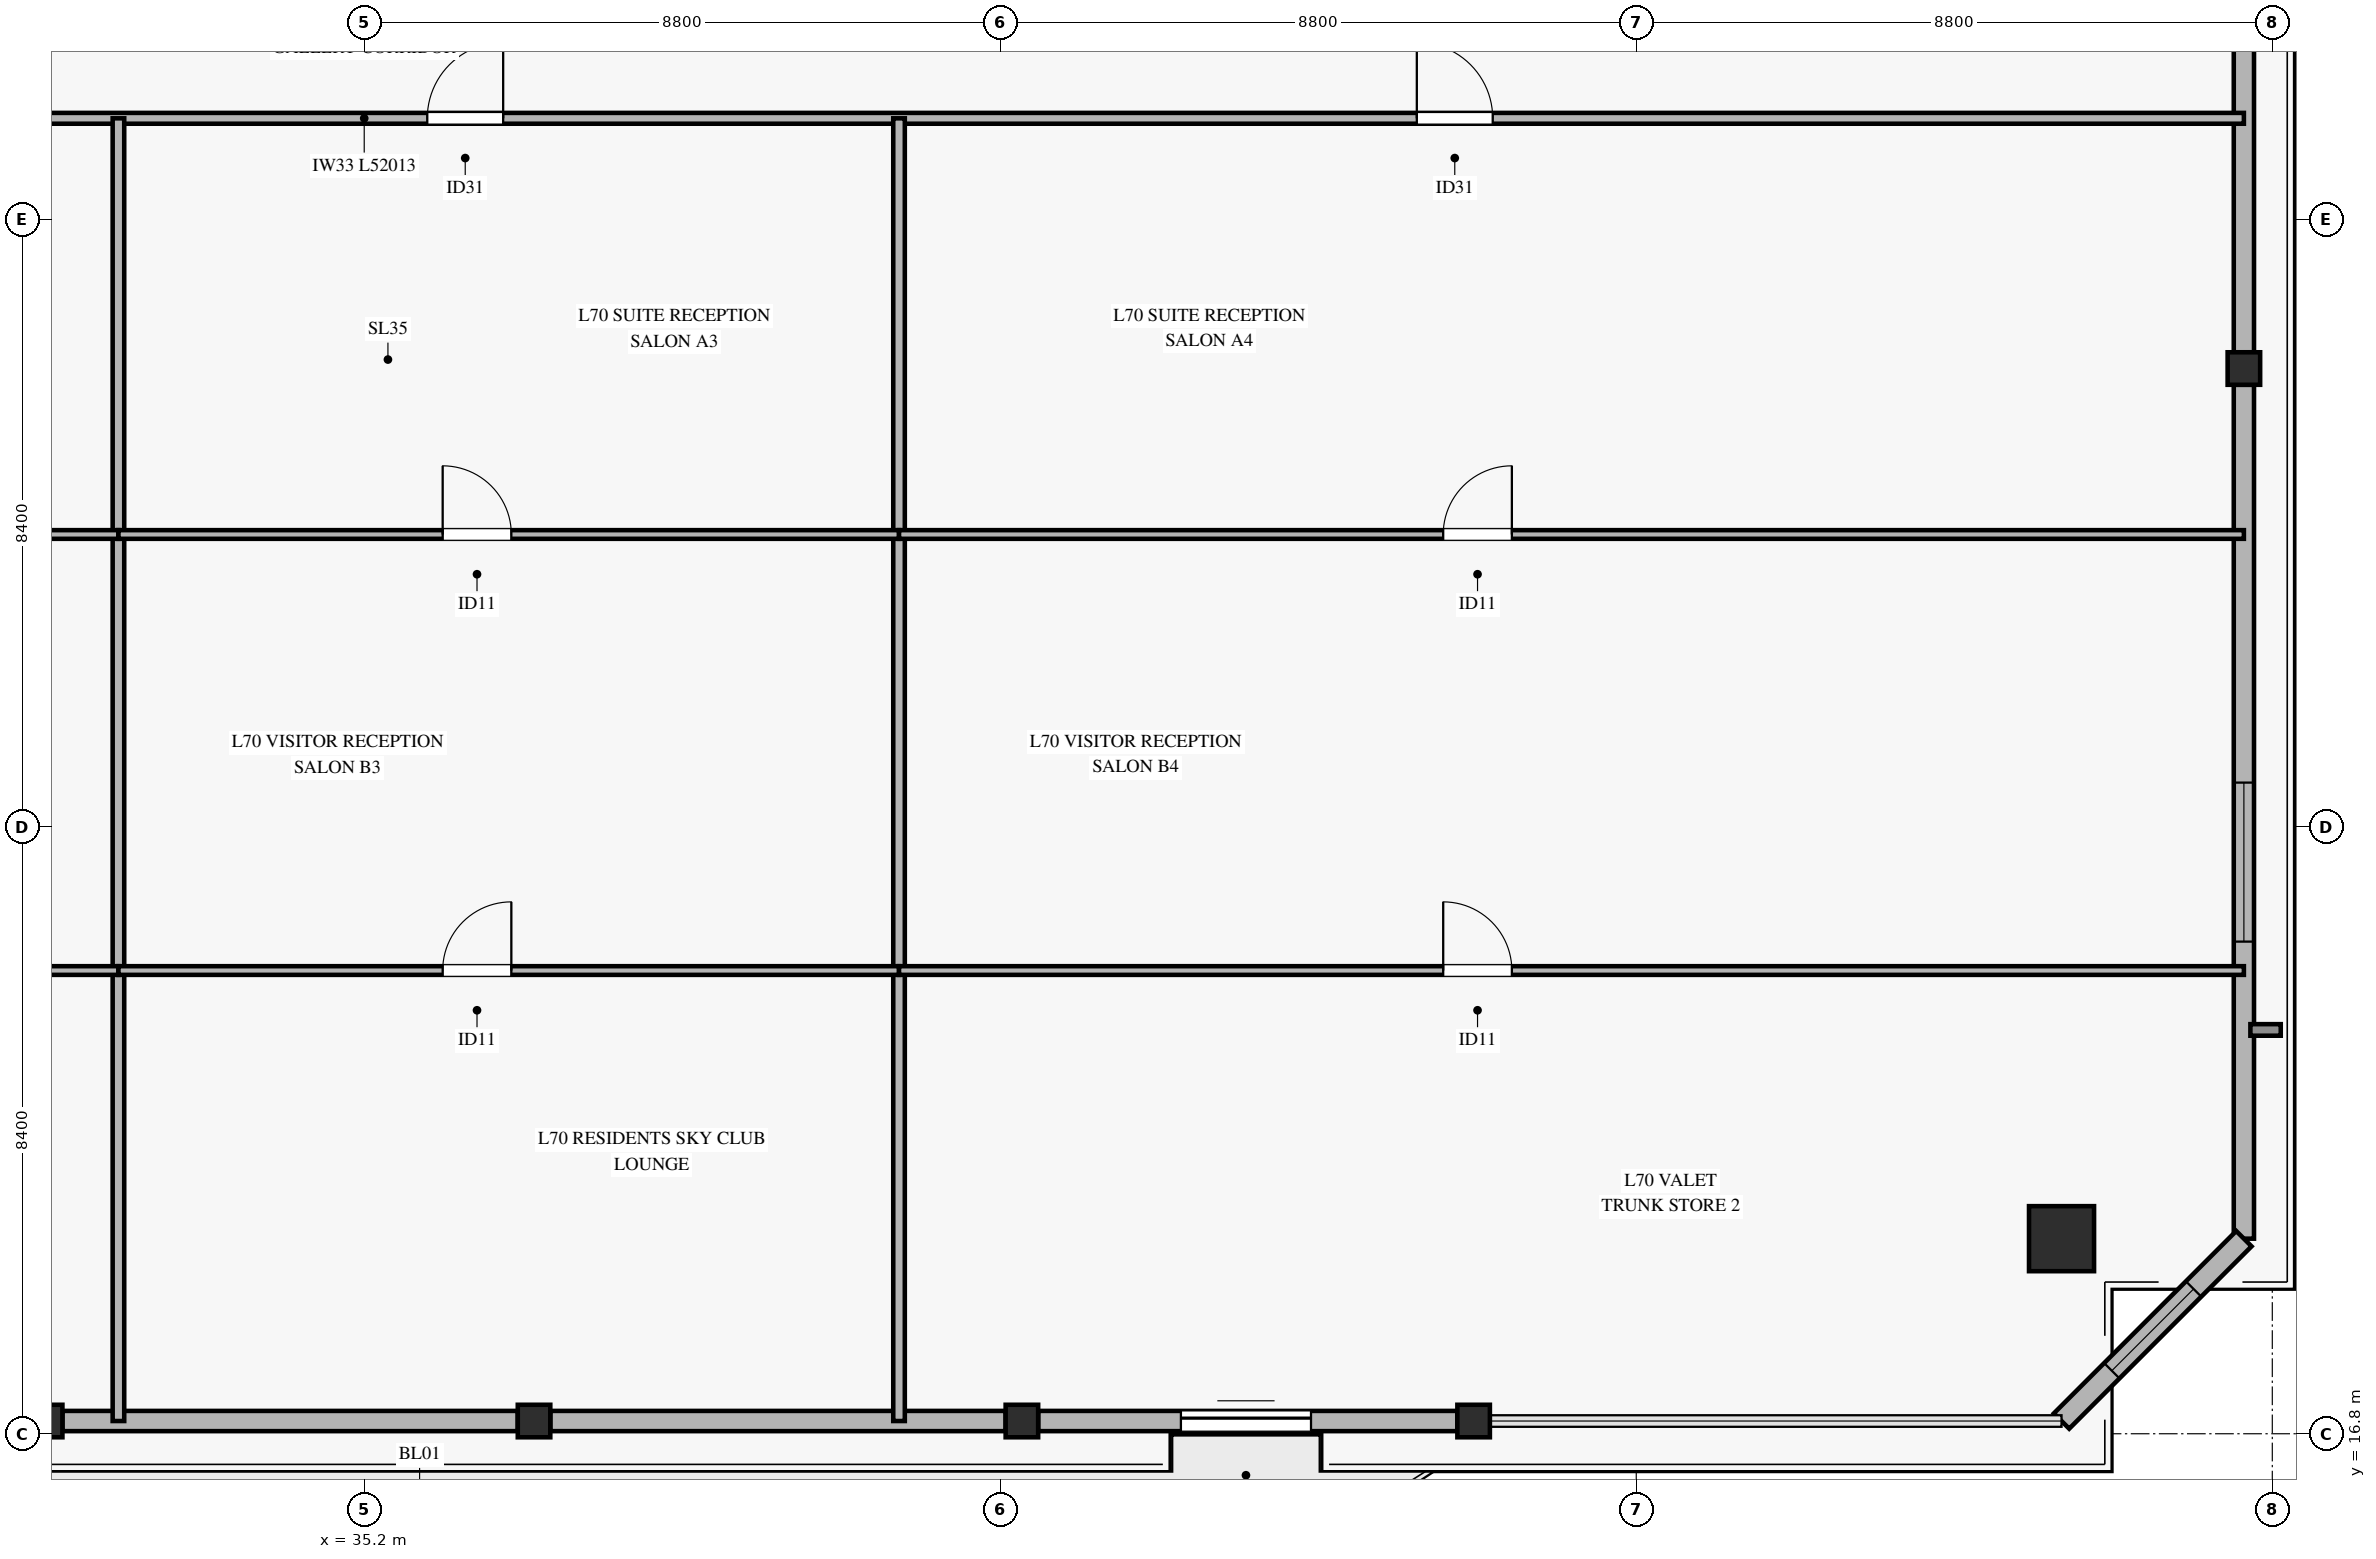
"""IFC4 building model, lengths in metres.
Left out: names, types, materials, properties, quantities, classifications, styles, units other than length and angle.
Written with IfcOpenShell. Run it as: python <this file> out.ifc"""

import sys

from ifc_helpers import new_model, si_unit, direction, frame, frame_2d, origin, origin_2d, place, context, subcontext, project, spatial, rectangle, hollow_rectangle, extrude, source, transform, mapped, element, fill, save


model = new_model("IFC4")
c1 = context("Model", 3, precision=1e-05, world=origin(), true_north=direction((0.0, 1.0)))
c2 = subcontext(c1, "Body", "Model", "MODEL_VIEW")
j1 = project(units=[si_unit("LENGTHUNIT", "METRE"), si_unit("PLANEANGLEUNIT", "RADIAN")], contexts=[c1])
p1 = place(None, origin())
s1 = spatial("IfcSite", under=j1, at=p1, CompositionType="ELEMENT")
p2 = place(p1, origin())
s2 = spatial("IfcBuilding", under=s1, at=p2, CompositionType="ELEMENT")
p3 = place(p2, frame((0.0, 0.0, 272.3)))
s3 = spatial("IfcBuildingStorey", under=s2, at=p3, CompositionType="ELEMENT", Elevation=272.3)
m1 = source(origin(), c2, "Body", "SweptSolid", [
    extrude(hollow_rectangle(XDim=0.9, YDim=0.9, WallThickness=0.04, at=origin_2d()), origin(), (0.0, 0.0, 1.0), 3.185),
])
p4 = place(p3, frame((58.684, 19.499, 0.0), z_axis=(0.0, 0.0, 1.0), x_axis=(1.0, 0.0, 0.0)))
e1 = element("IfcColumn", 1, at=p4, inside=s3, PredefinedType="COLUMN", context=c2, shape_type="MappedRepresentation", body=[
    mapped(m1, transform((0.0, 0.0, 0.0), x_axis=(1.0, 0.0, 0.0), y_axis=(0.0, 1.0, 0.0), z_axis=(0.0, 0.0, 1.0), scale=1.0)),
])
m2 = source(origin(), c2, "Body", "SweptSolid", [
    extrude(hollow_rectangle(XDim=0.45, YDim=0.45, WallThickness=0.022, at=origin_2d()), origin(), (0.0, 0.0, 1.0), 3.185),
])
for number, where, z_axis, x_axis in (
    (2, (30.8, 16.976, 0.0), (0.0, 0.0, 1.0), (1.0, 0.0, 0.0)),
    (3, (37.55, 16.976, 0.0), (0.0, 0.0, 1.0), (1.0, 0.0, 0.0)),
    (4, (44.3, 16.976, 0.0), (0.0, 0.0, 1.0), (1.0, 0.0, 0.0)),
    (5, (50.55, 16.976, 0.0), (0.0, 0.0, 1.0), (1.0, 0.0, 0.0)),
    (6, (61.207, 31.538, 0.0), (0.0, 0.0, 1.0), (1.0, 0.0, 0.0)),
):
    element("IfcColumn", number, at=place(p3, frame(where, z_axis=z_axis, x_axis=x_axis)), inside=s3, PredefinedType="COLUMN", context=c2, shape_type="MappedRepresentation", body=[
        mapped(m2, transform((0.0, 0.0, 0.0), x_axis=(1.0, 0.0, 0.0), y_axis=(0.0, 1.0, 0.0), z_axis=(0.0, 0.0, 1.0), scale=1.0)),
    ])
for number, where, z_axis, x_axis in (
    (7, (31.025, 16.976, 0.0), (0.0, 0.0, 1.0), (1.0, 0.0, 0.0)),
    (8, (37.775, 16.976, 0.0), (0.0, 0.0, 1.0), (1.0, 0.0, 0.0)),
):
    element("IfcWall", number, at=place(p3, frame(where, z_axis=z_axis, x_axis=x_axis)), inside=s3, PredefinedType="SOLIDWALL", context=c2, shape_type="SweptSolid", body=[
        extrude(rectangle(XDim=6.3, YDim=0.28, at=frame_2d((3.15, 0.0))), origin(), (0.0, 0.0, 1.0), 2.815),
    ])
p5 = place(p3, frame((44.525, 16.976, 0.0), z_axis=(0.0, 0.0, 1.0), x_axis=(1.0, 0.0, 0.0)))
e9 = element("IfcWall", 9, at=p5, inside=s3, PredefinedType="SOLIDWALL", context=c2, shape_type="SweptSolid", body=[
    extrude(rectangle(XDim=5.8, YDim=0.28, at=frame_2d((2.9, 0.0))), origin(), (0.0, 0.0, 1.0), 2.815),
])
p6 = place(p5, frame((1.975, 0.0, 0.0)))
e10 = element("IfcOpeningElement", 10, at=p6, cuts=e9, PredefinedType="OPENING", context=c2, shape_type="SweptSolid", body=[
    extrude(rectangle(XDim=1.8, YDim=2.25, at=frame_2d((0.9, 1.125))), frame((0.0, 0.15, 0.0), z_axis=(0.0, -1.0, 0.0), x_axis=(1.0, 0.0, 0.0)), (0.0, 0.0, 1.0), 0.3),
])
p7 = place(p3, frame((61.207, 19.499, 0.0), z_axis=(0.0, 0.0, 1.0), x_axis=(0.0, 1.0, 0.0)))
e11 = element("IfcWall", 11, at=p7, inside=s3, PredefinedType="SOLIDWALL", context=c2, shape_type="SweptSolid", body=[
    extrude(rectangle(XDim=11.814, YDim=0.28, at=frame_2d((5.907, 0.0))), origin(), (0.0, 0.0, 1.0), 2.815),
])
p8 = place(p7, frame((4.11, 0.0, 0.45)))
e12 = element("IfcOpeningElement", 12, at=p8, cuts=e11, PredefinedType="OPENING", context=c2, shape_type="SweptSolid", body=[
    extrude(rectangle(XDim=2.2, YDim=2.1, at=frame_2d((1.1, 1.05))), frame((0.0, 0.15, 0.0), z_axis=(0.0, -1.0, 0.0), x_axis=(1.0, 0.0, 0.0)), (0.0, 0.0, 1.0), 0.3),
])
p9 = place(p3, frame((61.207, 31.763, 0.0), z_axis=(0.0, 0.0, 1.0), x_axis=(0.0, 1.0, 0.0)))
e13 = element("IfcWall", 13, at=p9, inside=s3, PredefinedType="SOLIDWALL", context=c2, shape_type="SweptSolid", body=[
    extrude(rectangle(XDim=11.814, YDim=0.28, at=frame_2d((5.907, 0.0))), origin(), (0.0, 0.0, 1.0), 2.815),
])
p10 = place(p9, frame((7.049, 0.0, 0.45)))
e14 = element("IfcOpeningElement", 14, at=p10, cuts=e13, PredefinedType="OPENING", context=c2, shape_type="SweptSolid", body=[
    extrude(rectangle(XDim=2.2, YDim=2.1, at=frame_2d((1.1, 1.05))), frame((0.0, 0.15, 0.0), z_axis=(0.0, -1.0, 0.0), x_axis=(1.0, 0.0, 0.0)), (0.0, 0.0, 1.0), 0.3),
])
p11 = place(p3, frame((58.684, 16.976, 0.0), z_axis=(0.0, 0.0, 1.0), x_axis=(0.707106781187, 0.707106781187, 0.0)))
e15 = element("IfcWall", 15, at=p11, inside=s3, PredefinedType="SOLIDWALL", context=c2, shape_type="SweptSolid", body=[
    extrude(rectangle(XDim=3.568, YDim=0.3, at=frame_2d((1.784, 0.0))), origin(), (0.0, 0.0, 1.0), 2.815),
])
p12 = place(p11, frame((0.984, 0.0, 0.45)))
e16 = element("IfcOpeningElement", 16, at=p12, cuts=e15, PredefinedType="OPENING", context=c2, shape_type="SweptSolid", body=[
    extrude(rectangle(XDim=1.6, YDim=2.0, at=frame_2d((0.8, 1.0))), frame((0.0, 0.16, 0.0), z_axis=(0.0, -1.0, 0.0), x_axis=(1.0, 0.0, 0.0)), (0.0, 0.0, 1.0), 0.32),
])
p13 = place(p3, frame((9.194, 35.0, 0.0), z_axis=(0.0, 0.0, 1.0), x_axis=(1.0, 0.0, 0.0)))
e17 = element("IfcWall", 17, at=p13, inside=s3, PredefinedType="PARTITIONING", context=c2, shape_type="SweptSolid", body=[
    extrude(rectangle(XDim=52.013, YDim=0.15, at=frame_2d((26.006, 0.0))), origin(), (0.0, 0.0, 1.0), 2.47),
])
p14 = place(p13, frame((4.741, 0.0, 0.0)))
e18 = element("IfcOpeningElement", 18, at=p14, cuts=e17, PredefinedType="OPENING", context=c2, shape_type="SweptSolid", body=[
    extrude(rectangle(XDim=1.05, YDim=2.15, at=frame_2d((0.525, 1.075))), frame((0.0, 0.085, 0.0), z_axis=(0.0, -1.0, 0.0), x_axis=(1.0, 0.0, 0.0)), (0.0, 0.0, 1.0), 0.17),
])
p15 = place(p13, frame((16.017, 0.0, 0.0)))
e19 = element("IfcOpeningElement", 19, at=p15, cuts=e17, PredefinedType="OPENING", context=c2, shape_type="SweptSolid", body=[
    extrude(rectangle(XDim=1.05, YDim=2.15, at=frame_2d((0.525, 1.075))), frame((0.0, 0.085, 0.0), z_axis=(0.0, -1.0, 0.0), x_axis=(1.0, 0.0, 0.0)), (0.0, 0.0, 1.0), 0.17),
])
p16 = place(p13, frame((26.879, 0.0, 0.0)))
e20 = element("IfcOpeningElement", 20, at=p16, cuts=e17, PredefinedType="OPENING", context=c2, shape_type="SweptSolid", body=[
    extrude(rectangle(XDim=1.05, YDim=2.15, at=frame_2d((0.525, 1.075))), frame((0.0, 0.085, 0.0), z_axis=(0.0, -1.0, 0.0), x_axis=(1.0, 0.0, 0.0)), (0.0, 0.0, 1.0), 0.17),
])
p17 = place(p13, frame((40.57, 0.0, 0.0)))
e21 = element("IfcOpeningElement", 21, at=p17, cuts=e17, PredefinedType="OPENING", context=c2, shape_type="SweptSolid", body=[
    extrude(rectangle(XDim=1.05, YDim=2.15, at=frame_2d((0.525, 1.075))), frame((0.0, 0.085, 0.0), z_axis=(0.0, -1.0, 0.0), x_axis=(1.0, 0.0, 0.0)), (0.0, 0.0, 1.0), 0.17),
])
for number, where, z_axis, x_axis in (
    (22, (31.8, 16.976, 0.0), (0.0, 0.0, 1.0), (0.0, 1.0, 0.0)),
    (23, (42.6, 16.976, 0.0), (0.0, 0.0, 1.0), (0.0, 1.0, 0.0)),
):
    element("IfcWall", number, at=place(p3, frame(where, z_axis=z_axis, x_axis=x_axis)), inside=s3, PredefinedType="PARTITIONING", context=c2, shape_type="SweptSolid", body=[
        extrude(rectangle(XDim=18.024, YDim=0.16, at=frame_2d((9.012, 0.0))), origin(), (0.0, 0.0, 1.0), 2.77),
    ])
p18 = place(p3, frame((20.9, 23.209, 0.0), z_axis=(0.0, 0.0, 1.0), x_axis=(1.0, 0.0, 0.0)))
e24 = element("IfcWall", 24, at=p18, inside=s3, PredefinedType="PARTITIONING", context=c2, shape_type="SweptSolid", body=[
    extrude(rectangle(XDim=10.9, YDim=0.12, at=frame_2d((5.45, 0.0))), origin(), (0.0, 0.0, 1.0), 2.47),
])
p19 = place(p18, frame((4.526, 0.0, 0.0)))
e25 = element("IfcOpeningElement", 25, at=p19, cuts=e24, PredefinedType="OPENING", context=c2, shape_type="SweptSolid", body=[
    extrude(rectangle(XDim=0.95, YDim=2.1, at=frame_2d((0.475, 1.05))), frame((0.0, 0.07, 0.0), z_axis=(0.0, -1.0, 0.0), x_axis=(1.0, 0.0, 0.0)), (0.0, 0.0, 1.0), 0.14),
])
p20 = place(p3, frame((20.9, 29.242, 0.0), z_axis=(0.0, 0.0, 1.0), x_axis=(1.0, 0.0, 0.0)))
e26 = element("IfcWall", 26, at=p20, inside=s3, PredefinedType="PARTITIONING", context=c2, shape_type="SweptSolid", body=[
    extrude(rectangle(XDim=10.9, YDim=0.12, at=frame_2d((5.45, 0.0))), origin(), (0.0, 0.0, 1.0), 2.47),
])
p21 = place(p20, frame((4.526, 0.0, 0.0)))
e27 = element("IfcOpeningElement", 27, at=p21, cuts=e26, PredefinedType="OPENING", context=c2, shape_type="SweptSolid", body=[
    extrude(rectangle(XDim=0.95, YDim=2.1, at=frame_2d((0.475, 1.05))), frame((0.0, 0.07, 0.0), z_axis=(0.0, -1.0, 0.0), x_axis=(1.0, 0.0, 0.0)), (0.0, 0.0, 1.0), 0.14),
])
p22 = place(p3, frame((31.8, 23.209, 0.0), z_axis=(0.0, 0.0, 1.0), x_axis=(1.0, 0.0, 0.0)))
e28 = element("IfcWall", 28, at=p22, inside=s3, PredefinedType="PARTITIONING", context=c2, shape_type="SweptSolid", body=[
    extrude(rectangle(XDim=10.8, YDim=0.12, at=frame_2d((5.4, 0.0))), origin(), (0.0, 0.0, 1.0), 2.47),
])
p23 = place(p22, frame((4.486, 0.0, 0.0)))
e29 = element("IfcOpeningElement", 29, at=p23, cuts=e28, PredefinedType="OPENING", context=c2, shape_type="SweptSolid", body=[
    extrude(rectangle(XDim=0.95, YDim=2.1, at=frame_2d((0.475, 1.05))), frame((0.0, 0.07, 0.0), z_axis=(0.0, -1.0, 0.0), x_axis=(1.0, 0.0, 0.0)), (0.0, 0.0, 1.0), 0.14),
])
p24 = place(p3, frame((31.8, 29.242, 0.0), z_axis=(0.0, 0.0, 1.0), x_axis=(1.0, 0.0, 0.0)))
e30 = element("IfcWall", 30, at=p24, inside=s3, PredefinedType="PARTITIONING", context=c2, shape_type="SweptSolid", body=[
    extrude(rectangle(XDim=10.8, YDim=0.12, at=frame_2d((5.4, 0.0))), origin(), (0.0, 0.0, 1.0), 2.47),
])
p25 = place(p24, frame((4.486, 0.0, 0.0)))
e31 = element("IfcOpeningElement", 31, at=p25, cuts=e30, PredefinedType="OPENING", context=c2, shape_type="SweptSolid", body=[
    extrude(rectangle(XDim=0.95, YDim=2.1, at=frame_2d((0.475, 1.05))), frame((0.0, 0.07, 0.0), z_axis=(0.0, -1.0, 0.0), x_axis=(1.0, 0.0, 0.0)), (0.0, 0.0, 1.0), 0.14),
])
p26 = place(p3, frame((42.6, 23.209, 0.0), z_axis=(0.0, 0.0, 1.0), x_axis=(1.0, 0.0, 0.0)))
e32 = element("IfcWall", 32, at=p26, inside=s3, PredefinedType="PARTITIONING", context=c2, shape_type="SweptSolid", body=[
    extrude(rectangle(XDim=18.607, YDim=0.12, at=frame_2d((9.303, 0.0))), origin(), (0.0, 0.0, 1.0), 2.47),
])
p27 = place(p26, frame((7.529, 0.0, 0.0)))
e33 = element("IfcOpeningElement", 33, at=p27, cuts=e32, PredefinedType="OPENING", context=c2, shape_type="SweptSolid", body=[
    extrude(rectangle(XDim=0.95, YDim=2.1, at=frame_2d((0.475, 1.05))), frame((0.0, 0.07, 0.0), z_axis=(0.0, -1.0, 0.0), x_axis=(1.0, 0.0, 0.0)), (0.0, 0.0, 1.0), 0.14),
])
p28 = place(p3, frame((42.6, 29.242, 0.0), z_axis=(0.0, 0.0, 1.0), x_axis=(1.0, 0.0, 0.0)))
e34 = element("IfcWall", 34, at=p28, inside=s3, PredefinedType="PARTITIONING", context=c2, shape_type="SweptSolid", body=[
    extrude(rectangle(XDim=18.607, YDim=0.12, at=frame_2d((9.303, 0.0))), origin(), (0.0, 0.0, 1.0), 2.47),
])
p29 = place(p28, frame((7.529, 0.0, 0.0)))
e35 = element("IfcOpeningElement", 35, at=p29, cuts=e34, PredefinedType="OPENING", context=c2, shape_type="SweptSolid", body=[
    extrude(rectangle(XDim=0.95, YDim=2.1, at=frame_2d((0.475, 1.05))), frame((0.0, 0.07, 0.0), z_axis=(0.0, -1.0, 0.0), x_axis=(1.0, 0.0, 0.0)), (0.0, 0.0, 1.0), 0.14),
])
m3 = source(origin(), c2, "Body", "SweptSolid", [
    extrude(rectangle(XDim=1.8, YDim=2.25, at=frame_2d((0.9, 1.125))), frame((0.0, 0.025, 0.0), z_axis=(0.0, -1.0, 0.0), x_axis=(1.0, 0.0, 0.0)), (0.0, 0.0, 1.0), 0.05),
])
p30 = place(p6, origin())
e36 = element("IfcDoor", 36, at=p30, inside=s3, OperationType="SLIDING_TO_LEFT", PredefinedType="DOOR", context=c2, shape_type="MappedRepresentation", body=[
    mapped(m3, transform((0.0, 0.0, 0.0), x_axis=(1.0, 0.0, 0.0), y_axis=(0.0, 1.0, 0.0), z_axis=(0.0, 0.0, 1.0), scale=1.0)),
])
fill(e10, e36)
m4 = source(origin(), c2, "Body", "SweptSolid", [
    extrude(rectangle(XDim=2.2, YDim=2.1, at=frame_2d((1.1, 1.05))), frame((0.0, 0.03, 0.0), z_axis=(0.0, -1.0, 0.0), x_axis=(1.0, 0.0, 0.0)), (0.0, 0.0, 1.0), 0.06),
])
p31 = place(p8, origin())
e37 = element("IfcWindow", 37, at=p31, inside=s3, PartitioningType="SINGLE_PANEL", PredefinedType="WINDOW", context=c2, shape_type="MappedRepresentation", body=[
    mapped(m4, transform((0.0, 0.0, 0.0), x_axis=(1.0, 0.0, 0.0), y_axis=(0.0, 1.0, 0.0), z_axis=(0.0, 0.0, 1.0), scale=1.0)),
])
fill(e12, e37)
m5 = source(origin(), c2, "Body", "SweptSolid", [
    extrude(rectangle(XDim=1.6, YDim=2.0, at=frame_2d((0.8, 1.0))), frame((0.0, 0.03, 0.0), z_axis=(0.0, -1.0, 0.0), x_axis=(1.0, 0.0, 0.0)), (0.0, 0.0, 1.0), 0.06),
])
p32 = place(p12, origin())
e38 = element("IfcWindow", 38, at=p32, inside=s3, PartitioningType="SINGLE_PANEL", PredefinedType="WINDOW", context=c2, shape_type="MappedRepresentation", body=[
    mapped(m5, transform((0.0, 0.0, 0.0), x_axis=(1.0, 0.0, 0.0), y_axis=(0.0, 1.0, 0.0), z_axis=(0.0, 0.0, 1.0), scale=1.0)),
])
fill(e16, e38)
m6 = source(origin(), c2, "Body", "SweptSolid", [
    extrude(rectangle(XDim=1.05, YDim=2.15, at=frame_2d((0.525, 1.075))), frame((0.0, 0.025, 0.0), z_axis=(0.0, -1.0, 0.0), x_axis=(1.0, 0.0, 0.0)), (0.0, 0.0, 1.0), 0.05),
])
p33 = place(p16, origin())
e39 = element("IfcDoor", 39, at=p33, inside=s3, OperationType="SINGLE_SWING_RIGHT", PredefinedType="DOOR", context=c2, shape_type="MappedRepresentation", body=[
    mapped(m6, transform((0.0, 0.0, 0.0), x_axis=(1.0, 0.0, 0.0), y_axis=(0.0, 1.0, 0.0), z_axis=(0.0, 0.0, 1.0), scale=1.0)),
])
fill(e20, e39)
m7 = source(origin(), c2, "Body", "SweptSolid", [
    extrude(rectangle(XDim=0.95, YDim=2.1, at=frame_2d((0.475, 1.05))), frame((0.0, 0.025, 0.0), z_axis=(0.0, -1.0, 0.0), x_axis=(1.0, 0.0, 0.0)), (0.0, 0.0, 1.0), 0.05),
])
p34 = place(p25, origin())
e40 = element("IfcDoor", 40, at=p34, inside=s3, OperationType="SINGLE_SWING_LEFT", PredefinedType="DOOR", context=c2, shape_type="MappedRepresentation", body=[
    mapped(m7, transform((0.0, 0.0, 0.0), x_axis=(1.0, 0.0, 0.0), y_axis=(0.0, 1.0, 0.0), z_axis=(0.0, 0.0, 1.0), scale=1.0)),
])
fill(e31, e40)
p35 = place(p23, origin())
e41 = element("IfcDoor", 41, at=p35, inside=s3, OperationType="SINGLE_SWING_RIGHT", PredefinedType="DOOR", context=c2, shape_type="MappedRepresentation", body=[
    mapped(m7, transform((0.0, 0.0, 0.0), x_axis=(1.0, 0.0, 0.0), y_axis=(0.0, 1.0, 0.0), z_axis=(0.0, 0.0, 1.0), scale=1.0)),
])
fill(e29, e41)
p36 = place(p17, origin())
e42 = element("IfcDoor", 42, at=p36, inside=s3, OperationType="SINGLE_SWING_LEFT", PredefinedType="DOOR", context=c2, shape_type="MappedRepresentation", body=[
    mapped(m6, transform((0.0, 0.0, 0.0), x_axis=(1.0, 0.0, 0.0), y_axis=(0.0, 1.0, 0.0), z_axis=(0.0, 0.0, 1.0), scale=1.0)),
])
fill(e21, e42)
p37 = place(p29, origin())
e43 = element("IfcDoor", 43, at=p37, inside=s3, OperationType="SINGLE_SWING_RIGHT", PredefinedType="DOOR", context=c2, shape_type="MappedRepresentation", body=[
    mapped(m7, transform((0.0, 0.0, 0.0), x_axis=(1.0, 0.0, 0.0), y_axis=(0.0, 1.0, 0.0), z_axis=(0.0, 0.0, 1.0), scale=1.0)),
])
fill(e35, e43)
p38 = place(p27, origin())
e44 = element("IfcDoor", 44, at=p38, inside=s3, OperationType="SINGLE_SWING_LEFT", PredefinedType="DOOR", context=c2, shape_type="MappedRepresentation", body=[
    mapped(m7, transform((0.0, 0.0, 0.0), x_axis=(1.0, 0.0, 0.0), y_axis=(0.0, 1.0, 0.0), z_axis=(0.0, 0.0, 1.0), scale=1.0)),
])
fill(e33, e44)
save(model, sys.argv[1])
